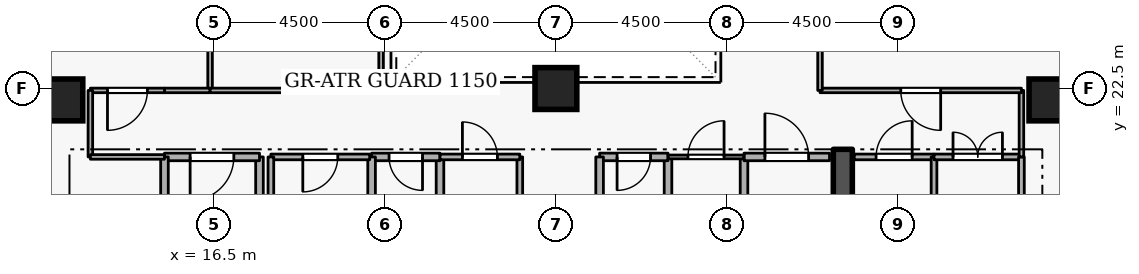
"""IFC4 building model, lengths in metres.
Left out: names, types, materials, properties, quantities, classifications, styles, units other than length and angle.
Written with IfcOpenShell. Run it as: python <this file> out.ifc"""

import sys

from ifc_helpers import new_model, si_unit, direction, frame, frame_2d, origin, origin_2d, place, context, subcontext, project, spatial, rectangle, extrude, element, fill, save


model = new_model("IFC4")
c1 = context("Model", 3, precision=1e-05, world=origin(), true_north=direction((0.0, 1.0)))
c2 = subcontext(c1, "Body", "Model", "MODEL_VIEW")
j1 = project(units=[si_unit("LENGTHUNIT", "METRE"), si_unit("PLANEANGLEUNIT", "RADIAN")], contexts=[c1])
p1 = place(None, origin())
s1 = spatial("IfcSite", under=j1, at=p1, CompositionType="ELEMENT")
p2 = place(p1, origin())
s2 = spatial("IfcBuilding", under=s1, at=p2, CompositionType="ELEMENT")
p3 = place(p2, frame((0.0, 0.0, 163.5)))
s3 = spatial("IfcBuildingStorey", under=s2, at=p3, CompositionType="ELEMENT", Elevation=163.5)
p4 = place(p3, frame((33.05, 15.1, 0.0), z_axis=(0.0, 0.0, 1.0), x_axis=(0.0, 1.0, 0.0)))
e1 = element("IfcWall", 1, at=p4, inside=s3, PredefinedType="SHEAR", context=c2, shape_type="SweptSolid", body=[
    extrude(rectangle(XDim=5.8, YDim=0.5, at=frame_2d((2.9, 0.0))), origin(), (0.0, 0.0, 1.0), 3.6),
])
for number, where, z_axis, x_axis in (
    (2, (12.5, 22.2, 0.0), (0.0, 0.0, 1.0), (1.0, 0.0, 0.0)),
    (3, (38.5, 22.2, 0.0), (0.0, 0.0, 1.0), (1.0, 0.0, 0.0)),
    (4, (25.5, 22.5, 0.0), (0.0, 0.0, 1.0), (1.0, 0.0, 0.0)),
):
    element("IfcColumn", number, at=place(p3, frame(where, z_axis=z_axis, x_axis=x_axis)), inside=s3, PredefinedType="COLUMN", context=c2, shape_type="SweptSolid", body=[
        extrude(rectangle(XDim=1.1, YDim=1.1, at=origin_2d()), origin(), (0.0, 0.0, 1.0), 3.6),
    ])
p5 = place(p3, frame((17.7, 18.4, 0.0), z_axis=(0.0, 0.0, 1.0), x_axis=(0.0, 1.0, 0.0)))
e5 = element("IfcWall", 5, at=p5, inside=s3, PredefinedType="STANDARD", context=c2, shape_type="SweptSolid", body=[
    extrude(rectangle(XDim=2.3, YDim=0.2, at=frame_2d((1.15, 0.0))), origin(), (0.0, 0.0, 1.0), 2.545),
])
p6 = place(p3, frame((17.7, 20.7, 0.0), z_axis=(0.0, 0.0, 1.0), x_axis=(-1.0, 0.0, 0.0)))
e6 = element("IfcWall", 6, at=p6, inside=s3, PredefinedType="STANDARD", context=c2, shape_type="SweptSolid", body=[
    extrude(rectangle(XDim=2.5, YDim=0.2, at=frame_2d((1.25, 0.0))), origin(), (0.0, 0.0, 1.0), 3.34),
])
p7 = place(p6, frame((0.675, 0.0, 0.0)))
e7 = element("IfcOpeningElement", 7, at=p7, cuts=e6, PredefinedType="OPENING", context=c2, shape_type="SweptSolid", body=[
    extrude(rectangle(XDim=1.15, YDim=2.1, at=frame_2d((0.575, 1.05))), frame((0.0, 0.11, 0.0), z_axis=(0.0, -1.0, 0.0), x_axis=(1.0, 0.0, 0.0)), (0.0, 0.0, 1.0), 0.22),
])
p8 = place(p3, frame((15.2, 20.7, 0.0), z_axis=(0.0, 0.0, 1.0), x_axis=(0.0, -1.0, 0.0)))
e8 = element("IfcWall", 8, at=p8, inside=s3, PredefinedType="STANDARD", context=c2, shape_type="SweptSolid", body=[
    extrude(rectangle(XDim=5.7, YDim=0.2, at=frame_2d((2.85, 0.0))), origin(), (0.0, 0.0, 1.0), 3.34),
])
p9 = place(p3, frame((28.45, 18.65, 0.0), z_axis=(0.0, 0.0, 1.0), x_axis=(0.0, 1.0, 0.0)))
e9 = element("IfcWall", 9, at=p9, inside=s3, PredefinedType="STANDARD", context=c2, shape_type="SweptSolid", body=[
    extrude(rectangle(XDim=2.05, YDim=0.2, at=frame_2d((1.025, 0.0))), origin(), (0.0, 0.0, 1.0), 3.34),
])
p10 = place(p3, frame((28.45, 20.7, 0.0), z_axis=(0.0, 0.0, 1.0), x_axis=(-1.0, 0.0, 0.0)))
e10 = element("IfcWall", 10, at=p10, inside=s3, PredefinedType="STANDARD", context=c2, shape_type="SweptSolid", body=[
    extrude(rectangle(XDim=1.8, YDim=0.2, at=frame_2d((0.9, 0.0))), origin(), (0.0, 0.0, 1.0), 3.34),
])
p11 = place(p10, frame((0.46, 0.0, 0.0)))
e11 = element("IfcOpeningElement", 11, at=p11, cuts=e10, PredefinedType="OPENING", context=c2, shape_type="SweptSolid", body=[
    extrude(rectangle(XDim=0.88, YDim=2.04, at=frame_2d((0.44, 1.02))), frame((0.0, 0.11, 0.0), z_axis=(0.0, -1.0, 0.0), x_axis=(1.0, 0.0, 0.0)), (0.0, 0.0, 1.0), 0.22),
])
for number, where, z_axis, x_axis in (
    (12, (26.65, 20.7, 0.0), (0.0, 0.0, 1.0), (0.0, -1.0, 0.0)),
    (13, (22.45, 18.65, 0.0), (0.0, 0.0, 1.0), (0.0, 1.0, 0.0)),
):
    element("IfcWall", number, at=place(p3, frame(where, z_axis=z_axis, x_axis=x_axis)), inside=s3, PredefinedType="STANDARD", context=c2, shape_type="SweptSolid", body=[
        extrude(rectangle(XDim=2.05, YDim=0.2, at=frame_2d((1.025, 0.0))), origin(), (0.0, 0.0, 1.0), 3.34),
    ])
p12 = place(p3, frame((22.45, 20.7, 0.0), z_axis=(0.0, 0.0, 1.0), x_axis=(-1.0, 0.0, 0.0)))
e14 = element("IfcWall", 14, at=p12, inside=s3, PredefinedType="STANDARD", context=c2, shape_type="SweptSolid", body=[
    extrude(rectangle(XDim=1.8, YDim=0.2, at=frame_2d((0.9, 0.0))), origin(), (0.0, 0.0, 1.0), 3.34),
])
p13 = place(p12, frame((0.46, 0.0, 0.0)))
e15 = element("IfcOpeningElement", 15, at=p13, cuts=e14, PredefinedType="OPENING", context=c2, shape_type="SweptSolid", body=[
    extrude(rectangle(XDim=0.88, YDim=2.04, at=frame_2d((0.44, 1.02))), frame((0.0, 0.11, 0.0), z_axis=(0.0, -1.0, 0.0), x_axis=(1.0, 0.0, 0.0)), (0.0, 0.0, 1.0), 0.22),
])
for number, where, z_axis, x_axis in (
    (16, (20.65, 20.7, 0.0), (0.0, 0.0, 1.0), (0.0, -1.0, 0.0)),
    (17, (30.45, 18.65, 0.0), (0.0, 0.0, 1.0), (0.0, 1.0, 0.0)),
):
    element("IfcWall", number, at=place(p3, frame(where, z_axis=z_axis, x_axis=x_axis)), inside=s3, PredefinedType="STANDARD", context=c2, shape_type="SweptSolid", body=[
        extrude(rectangle(XDim=2.05, YDim=0.2, at=frame_2d((1.025, 0.0))), origin(), (0.0, 0.0, 1.0), 3.34),
    ])
p14 = place(p3, frame((30.45, 20.7, 0.0), z_axis=(0.0, 0.0, 1.0), x_axis=(1.0, 0.0, 0.0)))
e18 = element("IfcWall", 18, at=p14, inside=s3, PredefinedType="STANDARD", context=c2, shape_type="SweptSolid", body=[
    extrude(rectangle(XDim=2.25, YDim=0.2, at=frame_2d((1.125, 0.0))), origin(), (0.0, 0.0, 1.0), 3.34),
])
p15 = place(p14, frame((0.55, 0.0, 0.0)))
e19 = element("IfcOpeningElement", 19, at=p15, cuts=e18, PredefinedType="OPENING", context=c2, shape_type="SweptSolid", body=[
    extrude(rectangle(XDim=1.15, YDim=2.1, at=frame_2d((0.575, 1.05))), frame((0.0, 0.11, 0.0), z_axis=(0.0, -1.0, 0.0), x_axis=(1.0, 0.0, 0.0)), (0.0, 0.0, 1.0), 0.22),
])
p16 = place(p3, frame((20.6, 20.7, 0.0), z_axis=(0.0, 0.0, 1.0), x_axis=(-1.0, 0.0, 0.0)))
e20 = element("IfcWall", 20, at=p16, inside=s3, PredefinedType="PARTITIONING", context=c2, shape_type="SweptSolid", body=[
    extrude(rectangle(XDim=2.6, YDim=0.15, at=frame_2d((1.3, 0.0))), origin(), (0.0, 0.0, 1.0), 3.34),
])
p17 = place(p16, frame((0.84, 0.0, 0.0)))
e21 = element("IfcOpeningElement", 21, at=p17, cuts=e20, PredefinedType="OPENING", context=c2, shape_type="SweptSolid", body=[
    extrude(rectangle(XDim=0.92, YDim=2.08, at=frame_2d((0.46, 1.04))), frame((0.0, 0.085, 0.0), z_axis=(0.0, -1.0, 0.0), x_axis=(1.0, 0.0, 0.0)), (0.0, 0.0, 1.0), 0.17),
])
p18 = place(p3, frame((18.0, 20.7, 0.0), z_axis=(0.0, 0.0, 1.0), x_axis=(0.0, -1.0, 0.0)))
e22 = element("IfcWall", 22, at=p18, inside=s3, PredefinedType="PARTITIONING", context=c2, shape_type="SweptSolid", body=[
    extrude(rectangle(XDim=2.05, YDim=0.15, at=frame_2d((1.025, 0.0))), origin(), (0.0, 0.0, 1.0), 2.545),
])
p19 = place(p3, frame((24.55, 20.7, 0.0), z_axis=(0.0, 0.0, 1.0), x_axis=(0.0, -1.0, 0.0)))
e23 = element("IfcWall", 23, at=p19, inside=s3, PredefinedType="PARTITIONING", context=c2, shape_type="SweptSolid", body=[
    extrude(rectangle(XDim=2.05, YDim=0.15, at=frame_2d((1.025, 0.0))), origin(), (0.0, 0.0, 1.0), 3.34),
])
p20 = place(p3, frame((22.45, 20.7, 0.0), z_axis=(0.0, 0.0, 1.0), x_axis=(1.0, 0.0, 0.0)))
e24 = element("IfcWall", 24, at=p20, inside=s3, PredefinedType="PARTITIONING", context=c2, shape_type="SweptSolid", body=[
    extrude(rectangle(XDim=2.1, YDim=0.15, at=frame_2d((1.05, 0.0))), origin(), (0.0, 0.0, 1.0), 3.34),
])
p21 = place(p20, frame((0.59, 0.0, 0.0)))
e25 = element("IfcOpeningElement", 25, at=p21, cuts=e24, PredefinedType="OPENING", context=c2, shape_type="SweptSolid", body=[
    extrude(rectangle(XDim=0.92, YDim=2.08, at=frame_2d((0.46, 1.04))), frame((0.0, 0.085, 0.0), z_axis=(0.0, -1.0, 0.0), x_axis=(1.0, 0.0, 0.0)), (0.0, 0.0, 1.0), 0.17),
])
p22 = place(p3, frame((28.45, 20.7, 0.0), z_axis=(0.0, 0.0, 1.0), x_axis=(1.0, 0.0, 0.0)))
e26 = element("IfcWall", 26, at=p22, inside=s3, PredefinedType="PARTITIONING", context=c2, shape_type="SweptSolid", body=[
    extrude(rectangle(XDim=2.0, YDim=0.1, at=frame_2d((1.0, 0.0))), origin(), (0.0, 0.0, 1.0), 3.34),
])
p23 = place(p22, frame((0.525, 0.0, 0.0)))
e27 = element("IfcOpeningElement", 27, at=p23, cuts=e26, PredefinedType="OPENING", context=c2, shape_type="SweptSolid", body=[
    extrude(rectangle(XDim=0.95, YDim=2.1, at=frame_2d((0.475, 1.05))), frame((0.0, 0.06, 0.0), z_axis=(0.0, -1.0, 0.0), x_axis=(1.0, 0.0, 0.0)), (0.0, 0.0, 1.0), 0.12),
])
p24 = place(p3, frame((33.35, 20.7, 0.0), z_axis=(0.0, 0.0, 1.0), x_axis=(1.0, 0.0, 0.0)))
e28 = element("IfcWall", 28, at=p24, inside=s3, PredefinedType="PARTITIONING", context=c2, shape_type="SweptSolid", body=[
    extrude(rectangle(XDim=2.1, YDim=0.15, at=frame_2d((1.05, 0.0))), origin(), (0.0, 0.0, 1.0), 3.34),
])
p25 = place(p24, frame((0.575, 0.0, 0.0)))
e29 = element("IfcOpeningElement", 29, at=p25, cuts=e28, PredefinedType="OPENING", context=c2, shape_type="SweptSolid", body=[
    extrude(rectangle(XDim=0.95, YDim=2.1, at=frame_2d((0.475, 1.05))), frame((0.0, 0.085, 0.0), z_axis=(0.0, -1.0, 0.0), x_axis=(1.0, 0.0, 0.0)), (0.0, 0.0, 1.0), 0.17),
])
p26 = place(p3, frame((35.45, 20.7, 0.0), z_axis=(0.0, 0.0, 1.0), x_axis=(0.0, -1.0, 0.0)))
e30 = element("IfcWall", 30, at=p26, inside=s3, PredefinedType="PARTITIONING", context=c2, shape_type="SweptSolid", body=[
    extrude(rectangle(XDim=5.65, YDim=0.15, at=frame_2d((2.825, 0.0))), origin(), (0.0, 0.0, 1.0), 3.34),
])
p27 = place(p3, frame((35.45, 20.7, 0.0), z_axis=(0.0, 0.0, 1.0), x_axis=(1.0, 0.0, 0.0)))
e31 = element("IfcWall", 31, at=p27, inside=s3, PredefinedType="PARTITIONING", context=c2, shape_type="SweptSolid", body=[
    extrude(rectangle(XDim=2.3, YDim=0.15, at=frame_2d((1.15, 0.0))), origin(), (0.0, 0.0, 1.0), 3.34),
])
p28 = place(p27, frame((0.5, 0.0, 0.0)))
e32 = element("IfcOpeningElement", 32, at=p28, cuts=e31, PredefinedType="OPENING", context=c2, shape_type="SweptSolid", body=[
    extrude(rectangle(XDim=1.3, YDim=2.12, at=frame_2d((0.65, 1.06))), frame((0.0, 0.085, 0.0), z_axis=(0.0, -1.0, 0.0), x_axis=(1.0, 0.0, 0.0)), (0.0, 0.0, 1.0), 0.17),
])
p29 = place(p3, frame((37.75, 20.7, 0.0), z_axis=(0.0, 0.0, 1.0), x_axis=(0.0, -1.0, 0.0)))
e33 = element("IfcWall", 33, at=p29, inside=s3, PredefinedType="PARTITIONING", context=c2, shape_type="SweptSolid", body=[
    extrude(rectangle(XDim=5.65, YDim=0.15, at=frame_2d((2.825, 0.0))), origin(), (0.0, 0.0, 1.0), 3.34),
])
p30 = place(p3, frame((16.4, 27.0, 0.0), z_axis=(0.0, 0.0, 1.0), x_axis=(0.0, -1.0, 0.0)))
e34 = element("IfcWall", 34, at=p30, inside=s3, PredefinedType="PARTITIONING", context=c2, shape_type="SweptSolid", body=[
    extrude(rectangle(XDim=4.55, YDim=0.12, at=frame_2d((2.275, 0.0))), origin(), (0.0, 0.0, 1.0), 3.34),
])
p31 = place(p3, frame((16.4, 22.45, 0.0), z_axis=(0.0, 0.0, 1.0), x_axis=(-1.0, 0.0, 0.0)))
e35 = element("IfcWall", 35, at=p31, inside=s3, PredefinedType="PARTITIONING", context=c2, shape_type="SweptSolid", body=[
    extrude(rectangle(XDim=1.2, YDim=0.12, at=frame_2d((0.6, 0.0))), origin(), (0.0, 0.0, 1.0), 3.34),
])
p32 = place(p3, frame((15.2, 22.45, 0.0), z_axis=(0.0, 0.0, 1.0), x_axis=(-1.0, 0.0, 0.0)))
e36 = element("IfcWall", 36, at=p32, inside=s3, PredefinedType="PARTITIONING", context=c2, shape_type="SweptSolid", body=[
    extrude(rectangle(XDim=1.95, YDim=0.12, at=frame_2d((0.975, 0.0))), origin(), (0.0, 0.0, 1.0), 3.34),
])
p33 = place(p32, frame((0.45, 0.0, 0.0)))
e37 = element("IfcOpeningElement", 37, at=p33, cuts=e36, PredefinedType="OPENING", context=c2, shape_type="SweptSolid", body=[
    extrude(rectangle(XDim=1.05, YDim=2.1, at=frame_2d((0.525, 1.05))), frame((0.0, 0.07, 0.0), z_axis=(0.0, -1.0, 0.0), x_axis=(1.0, 0.0, 0.0)), (0.0, 0.0, 1.0), 0.14),
])
p34 = place(p3, frame((13.25, 22.45, 0.0), z_axis=(0.0, 0.0, 1.0), x_axis=(0.0, -1.0, 0.0)))
e38 = element("IfcWall", 38, at=p34, inside=s3, PredefinedType="PARTITIONING", context=c2, shape_type="SweptSolid", body=[
    extrude(rectangle(XDim=1.75, YDim=0.12, at=frame_2d((0.875, 0.0))), origin(), (0.0, 0.0, 1.0), 3.34),
])
p35 = place(p3, frame((13.25, 20.7, 0.0), z_axis=(0.0, 0.0, 1.0), x_axis=(1.0, 0.0, 0.0)))
e39 = element("IfcWall", 39, at=p35, inside=s3, PredefinedType="PARTITIONING", context=c2, shape_type="SweptSolid", body=[
    extrude(rectangle(XDim=1.95, YDim=0.12, at=frame_2d((0.975, 0.0))), origin(), (0.0, 0.0, 1.0), 3.34),
])
p36 = place(p3, frame((20.9, 31.55, 0.0), z_axis=(0.0, 0.0, 1.0), x_axis=(0.0, -1.0, 0.0)))
e40 = element("IfcWall", 40, at=p36, inside=s3, PredefinedType="PARTITIONING", context=c2, shape_type="SweptSolid", body=[
    extrude(rectangle(XDim=9.1, YDim=0.12, at=frame_2d((4.55, 0.0))), origin(), (0.0, 0.0, 1.0), 3.34),
])
p37 = place(p3, frame((20.9, 22.45, 0.0), z_axis=(0.0, 0.0, 1.0), x_axis=(-1.0, 0.0, 0.0)))
e41 = element("IfcWall", 41, at=p37, inside=s3, PredefinedType="PARTITIONING", context=c2, shape_type="SweptSolid", body=[
    extrude(rectangle(XDim=4.5, YDim=0.12, at=frame_2d((2.25, 0.0))), origin(), (0.0, 0.0, 1.0), 3.34),
])
p38 = place(p3, frame((37.75, 20.7, 0.0), z_axis=(0.0, 0.0, 1.0), x_axis=(0.0, 1.0, 0.0)))
e42 = element("IfcWall", 42, at=p38, inside=s3, PredefinedType="PARTITIONING", context=c2, shape_type="SweptSolid", body=[
    extrude(rectangle(XDim=1.75, YDim=0.12, at=frame_2d((0.875, 0.0))), origin(), (0.0, 0.0, 1.0), 3.34),
])
p39 = place(p3, frame((37.75, 22.45, 0.0), z_axis=(0.0, 0.0, 1.0), x_axis=(-1.0, 0.0, 0.0)))
e43 = element("IfcWall", 43, at=p39, inside=s3, PredefinedType="PARTITIONING", context=c2, shape_type="SweptSolid", body=[
    extrude(rectangle(XDim=5.3, YDim=0.12, at=frame_2d((2.65, 0.0))), origin(), (0.0, 0.0, 1.0), 3.34),
])
p40 = place(p39, frame((2.125, 0.0, 0.0)))
e44 = element("IfcOpeningElement", 44, at=p40, cuts=e43, PredefinedType="OPENING", context=c2, shape_type="SweptSolid", body=[
    extrude(rectangle(XDim=1.05, YDim=2.1, at=frame_2d((0.525, 1.05))), frame((0.0, 0.07, 0.0), z_axis=(0.0, -1.0, 0.0), x_axis=(1.0, 0.0, 0.0)), (0.0, 0.0, 1.0), 0.14),
])
p41 = place(p3, frame((32.45, 22.45, 0.0), z_axis=(0.0, 0.0, 1.0), x_axis=(0.0, 1.0, 0.0)))
e45 = element("IfcWall", 45, at=p41, inside=s3, PredefinedType="PARTITIONING", context=c2, shape_type="SweptSolid", body=[
    extrude(rectangle(XDim=2.95, YDim=0.12, at=frame_2d((1.475, 0.0))), origin(), (0.0, 0.0, 1.0), 3.34),
])
p42 = place(p7, origin())
e46 = element("IfcDoor", 46, at=p42, inside=s3, OperationType="SINGLE_SWING_RIGHT", PredefinedType="DOOR", context=c2, shape_type="SweptSolid", body=[
    extrude(rectangle(XDim=1.15, YDim=2.1, at=frame_2d((0.575, 1.05))), frame((0.0, 0.025, 0.0), z_axis=(0.0, -1.0, 0.0), x_axis=(1.0, 0.0, 0.0)), (0.0, 0.0, 1.0), 0.05),
])
fill(e7, e46)
p43 = place(p11, origin())
e47 = element("IfcDoor", 47, at=p43, inside=s3, OperationType="SINGLE_SWING_RIGHT", PredefinedType="DOOR", context=c2, shape_type="SweptSolid", body=[
    extrude(rectangle(XDim=0.88, YDim=2.04, at=frame_2d((0.44, 1.02))), frame((0.0, 0.025, 0.0), z_axis=(0.0, -1.0, 0.0), x_axis=(1.0, 0.0, 0.0)), (0.0, 0.0, 1.0), 0.05),
])
fill(e11, e47)
p44 = place(p13, origin())
e48 = element("IfcDoor", 48, at=p44, inside=s3, OperationType="SINGLE_SWING_LEFT", PredefinedType="DOOR", context=c2, shape_type="SweptSolid", body=[
    extrude(rectangle(XDim=0.88, YDim=2.04, at=frame_2d((0.44, 1.02))), frame((0.0, 0.025, 0.0), z_axis=(0.0, -1.0, 0.0), x_axis=(1.0, 0.0, 0.0)), (0.0, 0.0, 1.0), 0.05),
])
fill(e15, e48)
p45 = place(p17, origin())
e49 = element("IfcDoor", 49, at=p45, inside=s3, OperationType="SINGLE_SWING_RIGHT", PredefinedType="DOOR", context=c2, shape_type="SweptSolid", body=[
    extrude(rectangle(XDim=0.92, YDim=2.08, at=frame_2d((0.46, 1.04))), frame((0.0, 0.025, 0.0), z_axis=(0.0, -1.0, 0.0), x_axis=(1.0, 0.0, 0.0)), (0.0, 0.0, 1.0), 0.05),
])
fill(e21, e49)
p46 = place(p21, origin())
e50 = element("IfcDoor", 50, at=p46, inside=s3, OperationType="SINGLE_SWING_LEFT", PredefinedType="DOOR", context=c2, shape_type="SweptSolid", body=[
    extrude(rectangle(XDim=0.92, YDim=2.08, at=frame_2d((0.46, 1.04))), frame((0.0, 0.025, 0.0), z_axis=(0.0, -1.0, 0.0), x_axis=(1.0, 0.0, 0.0)), (0.0, 0.0, 1.0), 0.05),
])
fill(e25, e50)
p47 = place(p23, origin())
e51 = element("IfcDoor", 51, at=p47, inside=s3, OperationType="SINGLE_SWING_RIGHT", PredefinedType="DOOR", context=c2, shape_type="SweptSolid", body=[
    extrude(rectangle(XDim=0.95, YDim=2.1, at=frame_2d((0.475, 1.05))), frame((0.0, 0.025, 0.0), z_axis=(0.0, -1.0, 0.0), x_axis=(1.0, 0.0, 0.0)), (0.0, 0.0, 1.0), 0.05),
])
fill(e27, e51)
p48 = place(p15, origin())
e52 = element("IfcDoor", 52, at=p48, inside=s3, OperationType="SINGLE_SWING_LEFT", PredefinedType="DOOR", context=c2, shape_type="SweptSolid", body=[
    extrude(rectangle(XDim=1.15, YDim=2.1, at=frame_2d((0.575, 1.05))), frame((0.0, 0.025, 0.0), z_axis=(0.0, -1.0, 0.0), x_axis=(1.0, 0.0, 0.0)), (0.0, 0.0, 1.0), 0.05),
])
fill(e19, e52)
p49 = place(p25, origin())
e53 = element("IfcDoor", 53, at=p49, inside=s3, OperationType="SINGLE_SWING_RIGHT", PredefinedType="DOOR", context=c2, shape_type="SweptSolid", body=[
    extrude(rectangle(XDim=0.95, YDim=2.1, at=frame_2d((0.475, 1.05))), frame((0.0, 0.025, 0.0), z_axis=(0.0, -1.0, 0.0), x_axis=(1.0, 0.0, 0.0)), (0.0, 0.0, 1.0), 0.05),
])
fill(e29, e53)
p50 = place(p28, origin())
e54 = element("IfcDoor", 54, at=p50, inside=s3, OperationType="DOUBLE_DOOR_SINGLE_SWING", PredefinedType="DOOR", context=c2, shape_type="SweptSolid", body=[
    extrude(rectangle(XDim=1.3, YDim=2.12, at=frame_2d((0.65, 1.06))), frame((0.0, 0.025, 0.0), z_axis=(0.0, -1.0, 0.0), x_axis=(1.0, 0.0, 0.0)), (0.0, 0.0, 1.0), 0.05),
])
fill(e32, e54)
p51 = place(p33, origin())
e55 = element("IfcDoor", 55, at=p51, inside=s3, OperationType="SINGLE_SWING_RIGHT", PredefinedType="DOOR", context=c2, shape_type="SweptSolid", body=[
    extrude(rectangle(XDim=1.05, YDim=2.1, at=frame_2d((0.525, 1.05))), frame((0.0, 0.025, 0.0), z_axis=(0.0, -1.0, 0.0), x_axis=(1.0, 0.0, 0.0)), (0.0, 0.0, 1.0), 0.05),
])
fill(e37, e55)
p52 = place(p40, origin())
e56 = element("IfcDoor", 56, at=p52, inside=s3, OperationType="SINGLE_SWING_LEFT", PredefinedType="DOOR", context=c2, shape_type="SweptSolid", body=[
    extrude(rectangle(XDim=1.05, YDim=2.1, at=frame_2d((0.525, 1.05))), frame((0.0, 0.025, 0.0), z_axis=(0.0, -1.0, 0.0), x_axis=(1.0, 0.0, 0.0)), (0.0, 0.0, 1.0), 0.05),
])
fill(e44, e56)
save(model, sys.argv[1])
